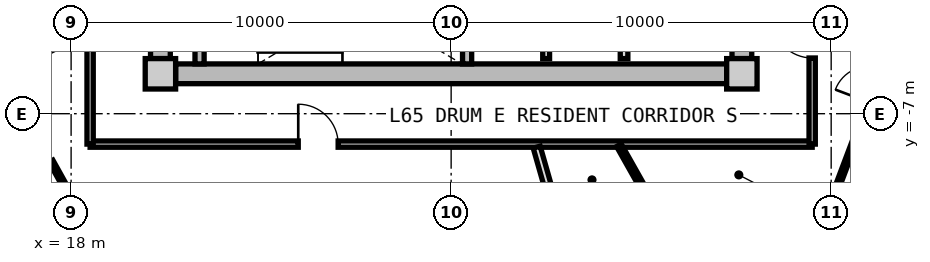
"""IFC4 building model, lengths in metres.
Left out: names, types, materials, properties, quantities, classifications, styles, units other than length and angle.
Written with IfcOpenShell. Run it as: python <this file> out.ifc"""

import sys

from ifc_helpers import new_model, si_unit, direction, frame, frame_2d, origin, origin_2d, place, context, subcontext, project, spatial, rectangle, extrude, source, transform, mapped, element, fill, save


model = new_model("IFC4")
c1 = context("Model", 3, precision=1e-05, world=origin(), true_north=direction((0.0, 1.0)))
c2 = subcontext(c1, "Body", "Model", "MODEL_VIEW")
j1 = project(units=[si_unit("LENGTHUNIT", "METRE"), si_unit("PLANEANGLEUNIT", "RADIAN")], contexts=[c1])
p1 = place(None, origin())
s1 = spatial("IfcSite", under=j1, at=p1, CompositionType="ELEMENT")
p2 = place(p1, origin())
s2 = spatial("IfcBuilding", under=s1, at=p2, CompositionType="ELEMENT")
p3 = place(p2, frame((0.0, 0.0, 210.85)))
s3 = spatial("IfcBuildingStorey", under=s2, at=p3, CompositionType="ELEMENT", Elevation=210.85)
m1 = source(origin(), c2, "Body", "SweptSolid", [
    extrude(rectangle(XDim=0.8, YDim=0.8, at=origin_2d()), origin(), (0.0, 0.0, 1.0), 3.05),
])
for number, where, z_axis, x_axis in (
    (1, (20.35, -5.95, 0.0), (0.0, 0.0, 1.0), (1.0, 0.0, 0.0)),
    (2, (35.65, -5.95, 0.0), (0.0, 0.0, 1.0), (1.0, 0.0, 0.0)),
):
    element("IfcColumn", number, at=place(p3, frame(where, z_axis=z_axis, x_axis=x_axis)), inside=s3, PredefinedType="COLUMN", context=c2, shape_type="MappedRepresentation", body=[
        mapped(m1, transform((0.0, 0.0, 0.0), x_axis=(1.0, 0.0, 0.0), y_axis=(0.0, 1.0, 0.0), z_axis=(0.0, 0.0, 1.0), scale=1.0)),
    ])
m2 = source(origin(), c2, "Body", "SweptSolid", [
    extrude(rectangle(XDim=14.5, YDim=0.52, at=frame_2d((7.25, 0.0))), origin(), (0.0, 0.0, 1.0), 2.76),
])
p4 = place(p3, frame((35.25, -5.95, 0.0), z_axis=(0.0, 0.0, 1.0), x_axis=(-1.0, 0.0, 0.0)))
e3 = element("IfcWall", 3, at=p4, inside=s3, PredefinedType="SHEAR", context=c2, shape_type="MappedRepresentation", body=[
    mapped(m2, transform((0.0, 0.0, 0.0), x_axis=(1.0, 0.0, 0.0), y_axis=(0.0, 1.0, 0.0), z_axis=(0.0, 0.0, 1.0), scale=1.0)),
])
m3 = source(origin(), c2, "Body", "SweptSolid", [
    extrude(rectangle(XDim=11.1, YDim=0.52, at=frame_2d((5.55, 0.0))), origin(), (0.0, 0.0, 1.0), 2.76),
])
p5 = place(p3, frame((20.35, -5.55, 0.0), z_axis=(0.0, 0.0, 1.0), x_axis=(0.0, 1.0, 0.0)))
e4 = element("IfcWall", 4, at=p5, inside=s3, PredefinedType="SHEAR", context=c2, shape_type="MappedRepresentation", body=[
    mapped(m3, transform((0.0, 0.0, 0.0), x_axis=(1.0, 0.0, 0.0), y_axis=(0.0, 1.0, 0.0), z_axis=(0.0, 0.0, 1.0), scale=1.0)),
])
p6 = place(p5, frame((3.8, 0.0, 0.0)))
e5 = element("IfcOpeningElement", 5, at=p6, cuts=e4, PredefinedType="OPENING", context=c2, shape_type="SweptSolid", body=[
    extrude(rectangle(XDim=1.2, YDim=2.15, at=frame_2d((0.6, 1.075))), frame((0.0, 0.27, 0.0), z_axis=(0.0, -1.0, 0.0), x_axis=(1.0, 0.0, 0.0)), (0.0, 0.0, 1.0), 0.54),
])
p7 = place(p3, frame((35.65, 5.55, 0.0), z_axis=(0.0, 0.0, 1.0), x_axis=(0.0, -1.0, 0.0)))
e6 = element("IfcWall", 6, at=p7, inside=s3, PredefinedType="SHEAR", context=c2, shape_type="MappedRepresentation", body=[
    mapped(m3, transform((0.0, 0.0, 0.0), x_axis=(1.0, 0.0, 0.0), y_axis=(0.0, 1.0, 0.0), z_axis=(0.0, 0.0, 1.0), scale=1.0)),
])
p8 = place(p7, frame((5.65, 0.0, 0.0)))
e7 = element("IfcOpeningElement", 7, at=p8, cuts=e6, PredefinedType="OPENING", context=c2, shape_type="SweptSolid", body=[
    extrude(rectangle(XDim=1.2, YDim=2.15, at=frame_2d((0.6, 1.075))), frame((0.0, 0.27, 0.0), z_axis=(0.0, -1.0, 0.0), x_axis=(1.0, 0.0, 0.0)), (0.0, 0.0, 1.0), 0.54),
])
p9 = place(p7, frame((9.3, 0.0, 0.0)))
e8 = element("IfcOpeningElement", 8, at=p9, cuts=e6, PredefinedType="OPENING", context=c2, shape_type="SweptSolid", body=[
    extrude(rectangle(XDim=1.0, YDim=2.1, at=frame_2d((0.5, 1.05))), frame((0.0, 0.27, 0.0), z_axis=(0.0, -1.0, 0.0), x_axis=(1.0, 0.0, 0.0)), (0.0, 0.0, 1.0), 0.54),
])
m4 = source(origin(), c2, "Body", "SweptSolid", [
    extrude(rectangle(XDim=3.24, YDim=0.24, at=frame_2d((1.62, 0.0))), origin(), (0.0, 0.0, 1.0), 2.76),
])
for number, where, z_axis, x_axis in (
    (9, (21.38, -5.69, 0.0), (0.0, 0.0, 1.0), (0.0, 1.0, 0.0)),
    (10, (28.42, -5.69, 0.0), (0.0, 0.0, 1.0), (0.0, 1.0, 0.0)),
):
    element("IfcWall", number, at=place(p3, frame(where, z_axis=z_axis, x_axis=x_axis)), inside=s3, PredefinedType="PARTITIONING", context=c2, shape_type="MappedRepresentation", body=[
        mapped(m4, transform((0.0, 0.0, 0.0), x_axis=(1.0, 0.0, 0.0), y_axis=(0.0, 1.0, 0.0), z_axis=(0.0, 0.0, 1.0), scale=1.0)),
    ])
m5 = source(origin(), c2, "Body", "SweptSolid", [
    extrude(rectangle(XDim=3.8, YDim=0.2, at=frame_2d((1.9, 0.0))), origin(), (0.0, 0.0, 1.0), 2.745),
])
p10 = place(p3, frame((32.55, -5.55, 0.0), z_axis=(0.0, 0.0, 1.0), x_axis=(0.0, 1.0, 0.0)))
e11 = element("IfcWall", 11, at=p10, inside=s3, PredefinedType="PARTITIONING", context=c2, shape_type="MappedRepresentation", body=[
    mapped(m5, transform((0.0, 0.0, 0.0), x_axis=(1.0, 0.0, 0.0), y_axis=(0.0, 1.0, 0.0), z_axis=(0.0, 0.0, 1.0), scale=1.0)),
])
m6 = source(origin(), c2, "Body", "SweptSolid", [
    extrude(rectangle(XDim=4.2, YDim=0.18, at=frame_2d((2.1, 0.0))), origin(), (0.0, 0.0, 1.0), 2.745),
])
p11 = place(p3, frame((30.5, -5.55, 0.0), z_axis=(0.0, 0.0, 1.0), x_axis=(0.0, 1.0, 0.0)))
e12 = element("IfcWall", 12, at=p11, inside=s3, PredefinedType="PARTITIONING", context=c2, shape_type="MappedRepresentation", body=[
    mapped(m6, transform((0.0, 0.0, 0.0), x_axis=(1.0, 0.0, 0.0), y_axis=(0.0, 1.0, 0.0), z_axis=(0.0, 0.0, 1.0), scale=1.0)),
])
m7 = source(origin(), c2, "Body", "SweptSolid", [
    extrude(rectangle(XDim=19.0, YDim=0.165, at=frame_2d((9.5, 0.0))), origin(), (0.0, 0.0, 1.0), 2.745),
])
p12 = place(p3, frame((37.5, -7.8, 0.0), z_axis=(0.0, 0.0, 1.0), x_axis=(-1.0, 0.0, 0.0)))
e13 = element("IfcWall", 13, at=p12, inside=s3, PredefinedType="PARTITIONING", context=c2, shape_type="MappedRepresentation", body=[
    mapped(m7, transform((0.0, 0.0, 0.0), x_axis=(1.0, 0.0, 0.0), y_axis=(0.0, 1.0, 0.0), z_axis=(0.0, 0.0, 1.0), scale=1.0)),
])
p13 = place(p12, frame((12.473, 0.0, 0.0)))
e14 = element("IfcOpeningElement", 14, at=p13, cuts=e13, PredefinedType="OPENING", context=c2, shape_type="SweptSolid", body=[
    extrude(rectangle(XDim=1.05, YDim=2.15, at=frame_2d((0.525, 1.075))), frame((0.0, 0.093, 0.0), z_axis=(0.0, -1.0, 0.0), x_axis=(1.0, 0.0, 0.0)), (0.0, 0.0, 1.0), 0.185),
])
m8 = source(origin(), c2, "Body", "SweptSolid", [
    extrude(rectangle(XDim=6.88, YDim=0.165, at=frame_2d((3.44, 0.0))), origin(), (0.0, 0.0, 1.0), 2.745),
])
p14 = place(p3, frame((18.5, -7.8, 0.0), z_axis=(0.0, 0.0, 1.0), x_axis=(0.0, 1.0, 0.0)))
e15 = element("IfcWall", 15, at=p14, inside=s3, PredefinedType="PARTITIONING", context=c2, shape_type="MappedRepresentation", body=[
    mapped(m8, transform((0.0, 0.0, 0.0), x_axis=(1.0, 0.0, 0.0), y_axis=(0.0, 1.0, 0.0), z_axis=(0.0, 0.0, 1.0), scale=1.0)),
])
p15 = place(p3, frame((37.5, -0.92, 0.0), z_axis=(0.0, 0.0, 1.0), x_axis=(0.0, -1.0, 0.0)))
e16 = element("IfcWall", 16, at=p15, inside=s3, PredefinedType="PARTITIONING", context=c2, shape_type="MappedRepresentation", body=[
    mapped(m8, transform((0.0, 0.0, 0.0), x_axis=(1.0, 0.0, 0.0), y_axis=(0.0, 1.0, 0.0), z_axis=(0.0, 0.0, 1.0), scale=1.0)),
])
p16 = place(p15, frame((3.564, 0.0, 0.0)))
e17 = element("IfcOpeningElement", 17, at=p16, cuts=e16, PredefinedType="OPENING", context=c2, shape_type="SweptSolid", body=[
    extrude(rectangle(XDim=1.05, YDim=2.15, at=frame_2d((0.525, 1.075))), frame((0.0, 0.093, 0.0), z_axis=(0.0, -1.0, 0.0), x_axis=(1.0, 0.0, 0.0)), (0.0, 0.0, 1.0), 0.185),
])
m9 = source(origin(), c2, "Body", "SweptSolid", [
    extrude(rectangle(XDim=6.974, YDim=0.19, at=frame_2d((3.487, 0.0))), origin(), (0.0, 0.0, 1.0), 2.345),
])
p17 = place(p3, frame((30.251, -7.88, 0.0), z_axis=(0.0, 0.0, 1.0), x_axis=(0.274707256801, -0.961527910703, 0.0)))
e18 = element("IfcWall", 18, at=p17, inside=s3, PredefinedType="PARTITIONING", context=c2, shape_type="MappedRepresentation", body=[
    mapped(m9, transform((0.0, 0.0, 0.0), x_axis=(1.0, 0.0, 0.0), y_axis=(0.0, 1.0, 0.0), z_axis=(0.0, 0.0, 1.0), scale=1.0)),
])
m10 = source(origin(), c2, "Body", "SweptSolid", [
    extrude(rectangle(XDim=1.638, YDim=0.14, at=frame_2d((0.819, 0.0))), origin(), (0.0, 0.0, 1.0), 2.745),
])
p18 = place(p3, frame((18.47, -4.778, 0.0), z_axis=(0.0, 0.0, 1.0), x_axis=(-0.893919977945, -0.448226586707, 0.0)))
e19 = element("IfcWall", 19, at=p18, inside=s3, PredefinedType="PARTITIONING", context=c2, shape_type="MappedRepresentation", body=[
    mapped(m10, transform((0.0, 0.0, 0.0), x_axis=(1.0, 0.0, 0.0), y_axis=(0.0, 1.0, 0.0), z_axis=(0.0, 0.0, 1.0), scale=1.0)),
])
m11 = source(origin(), c2, "Body", "SweptSolid", [
    extrude(rectangle(XDim=3.472, YDim=0.115, at=frame_2d((1.736, 0.0))), origin(), (0.0, 0.0, 1.0), 2.745),
])
p19 = place(p3, frame((16.396, -6.317, 0.0), z_axis=(0.0, 0.0, 1.0), x_axis=(0.485804139346, -0.874067696574, 0.0)))
e20 = element("IfcWall", 20, at=p19, inside=s3, PredefinedType="PARTITIONING", context=c2, shape_type="MappedRepresentation", body=[
    mapped(m11, transform((0.0, 0.0, 0.0), x_axis=(1.0, 0.0, 0.0), y_axis=(0.0, 1.0, 0.0), z_axis=(0.0, 0.0, 1.0), scale=1.0)),
])
p20 = place(p19, frame((1.261, 0.0, 0.0)))
e21 = element("IfcOpeningElement", 21, at=p20, cuts=e20, PredefinedType="OPENING", context=c2, shape_type="SweptSolid", body=[
    extrude(rectangle(XDim=0.95, YDim=2.1, at=frame_2d((0.475, 1.05))), frame((0.0, 0.067, 0.0), z_axis=(0.0, -1.0, 0.0), x_axis=(1.0, 0.0, 0.0)), (0.0, 0.0, 1.0), 0.135),
])
m12 = source(origin(), c2, "Body", "SweptSolid", [
    extrude(rectangle(XDim=6.738, YDim=0.115, at=frame_2d((3.369, 0.0))), origin(), (0.0, 0.0, 1.0), 2.745),
])
p21 = place(p3, frame((37.978, -9.409, 0.0), z_axis=(0.0, 0.0, 1.0), x_axis=(0.352945344347, 0.935643940772, 0.0)))
e22 = element("IfcWall", 22, at=p21, inside=s3, PredefinedType="PARTITIONING", context=c2, shape_type="MappedRepresentation", body=[
    mapped(m12, transform((0.0, 0.0, 0.0), x_axis=(1.0, 0.0, 0.0), y_axis=(0.0, 1.0, 0.0), z_axis=(0.0, 0.0, 1.0), scale=1.0)),
])
p22 = place(p21, frame((2.894, 0.0, 0.0)))
e23 = element("IfcOpeningElement", 23, at=p22, cuts=e22, PredefinedType="OPENING", context=c2, shape_type="SweptSolid", body=[
    extrude(rectangle(XDim=0.95, YDim=2.1, at=frame_2d((0.475, 1.05))), frame((0.0, 0.067, 0.0), z_axis=(0.0, -1.0, 0.0), x_axis=(1.0, 0.0, 0.0)), (0.0, 0.0, 1.0), 0.135),
])
m13 = source(origin(), c2, "Body", "SweptSolid", [
    extrude(rectangle(XDim=2.035, YDim=0.14, at=frame_2d((1.018, 0.0))), origin(), (0.0, 0.0, 1.0), 2.745),
])
p23 = place(p3, frame((32.415, -7.83, 0.0), z_axis=(0.0, 0.0, 1.0), x_axis=(0.491092509169, -0.871107425888, 0.0)))
e24 = element("IfcWall", 24, at=p23, inside=s3, PredefinedType="PARTITIONING", context=c2, shape_type="MappedRepresentation", body=[
    mapped(m13, transform((0.0, 0.0, 0.0), x_axis=(1.0, 0.0, 0.0), y_axis=(0.0, 1.0, 0.0), z_axis=(0.0, 0.0, 1.0), scale=1.0)),
])
m14 = source(origin(), c2, "Body", "SweptSolid", [
    extrude(rectangle(XDim=1.05, YDim=2.15, at=frame_2d((0.525, 1.075))), frame((0.0, 0.025, 0.0), z_axis=(0.0, -1.0, 0.0), x_axis=(1.0, 0.0, 0.0)), (0.0, 0.0, 1.0), 0.05),
])
p24 = place(p13, frame((1.05, 0.0, 0.0), z_axis=(0.0, 0.0, 1.0), x_axis=(-1.0, 0.0, 0.0)))
e25 = element("IfcDoor", 25, at=p24, inside=s3, OperationType="SINGLE_SWING_LEFT", PredefinedType="DOOR", context=c2, shape_type="MappedRepresentation", body=[
    mapped(m14, transform((0.0, 0.0, 0.0), x_axis=(1.0, 0.0, 0.0), y_axis=(0.0, 1.0, 0.0), z_axis=(0.0, 0.0, 1.0), scale=1.0)),
])
fill(e14, e25)
p25 = place(p16, frame((1.05, 0.0, 0.0), z_axis=(0.0, 0.0, 1.0), x_axis=(-1.0, 0.0, 0.0)))
e26 = element("IfcDoor", 26, at=p25, inside=s3, OperationType="SINGLE_SWING_RIGHT", PredefinedType="DOOR", context=c2, shape_type="MappedRepresentation", body=[
    mapped(m14, transform((0.0, 0.0, 0.0), x_axis=(1.0, 0.0, 0.0), y_axis=(0.0, 1.0, 0.0), z_axis=(0.0, 0.0, 1.0), scale=1.0)),
])
fill(e17, e26)
save(model, sys.argv[1])
